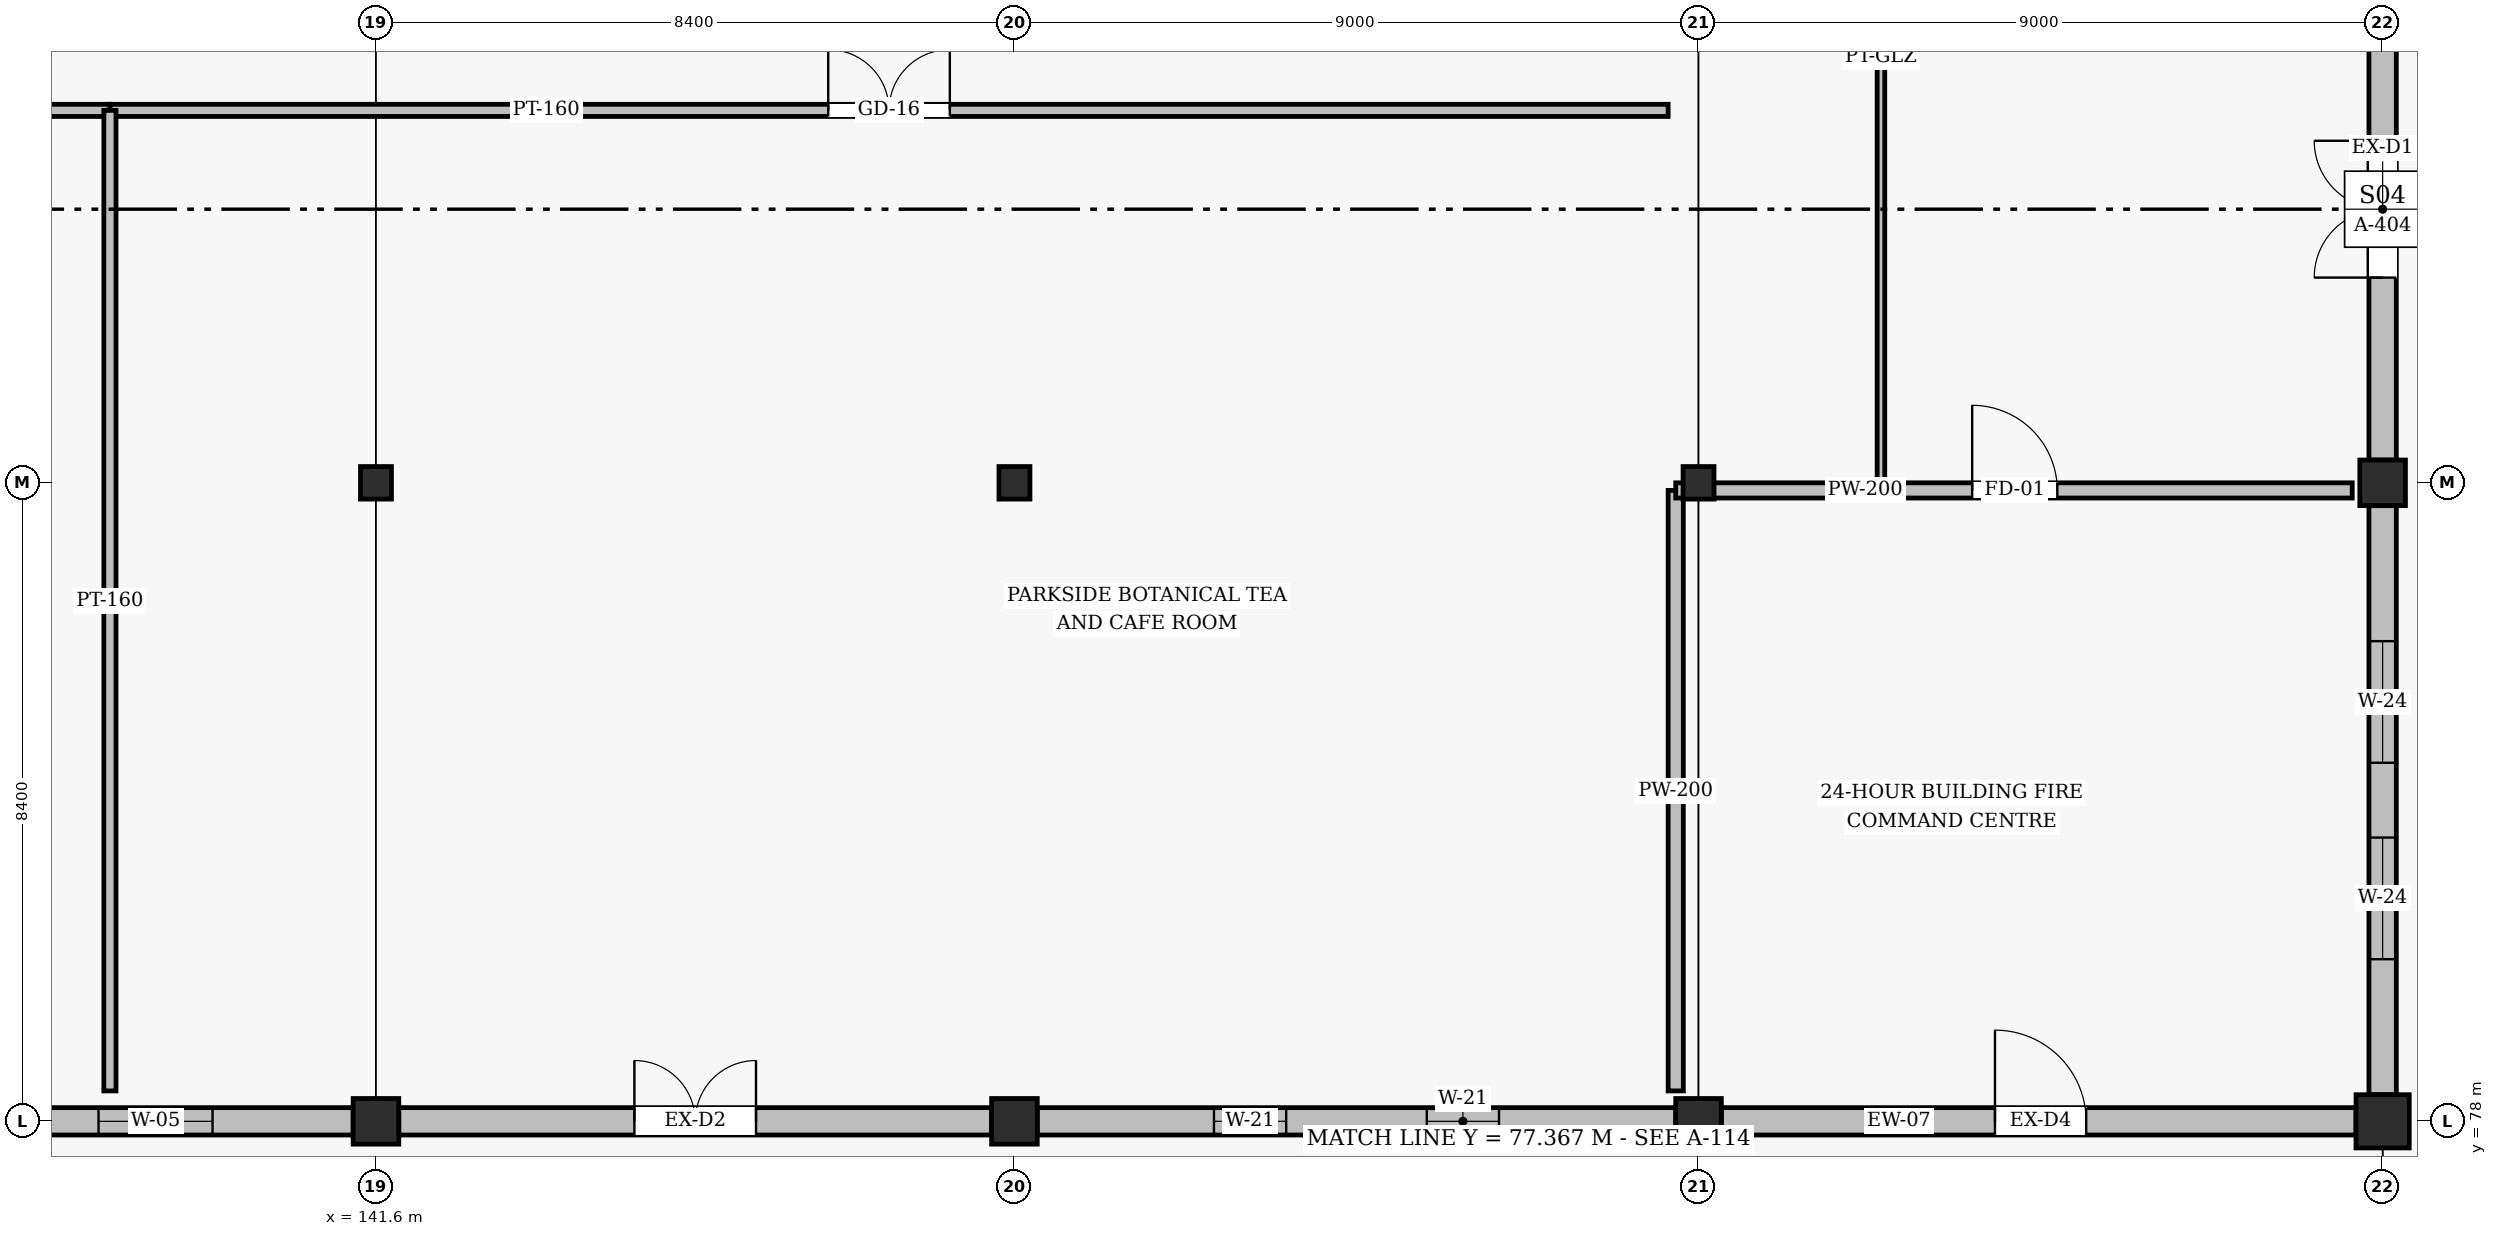
"""IFC4 building model, lengths in metres.
Left out: names, types, materials, properties, quantities, classifications, styles, units other than length and angle.
Written with IfcOpenShell. Run it as: python <this file> out.ifc"""

import sys

from ifc_helpers import new_model, si_unit, direction, frame, frame_2d, origin, origin_2d, place, context, subcontext, project, spatial, rectangle, hollow_rectangle, i_section, extrude, element, fill, save


model = new_model("IFC4")
c1 = context("Model", 3, precision=1e-05, world=origin(), true_north=direction((0.0, 1.0)))
c2 = subcontext(c1, "Body", "Model", "MODEL_VIEW")
j1 = project(units=[si_unit("LENGTHUNIT", "METRE"), si_unit("PLANEANGLEUNIT", "RADIAN")], contexts=[c1])
p1 = place(None, origin())
s1 = spatial("IfcSite", under=j1, at=p1, CompositionType="ELEMENT")
p2 = place(p1, origin())
s2 = spatial("IfcBuilding", under=s1, at=p2, CompositionType="ELEMENT")
p3 = place(p2, origin())
s3 = spatial("IfcBuildingStorey", under=s2, at=p3, CompositionType="ELEMENT", Elevation=0.0)
p4 = place(p3, frame((141.6, 78.0, 0.0), z_axis=(0.0, 0.0, 1.0), x_axis=(1.0, 0.0, 0.0)))
e1 = element("IfcColumn", 1, at=p4, inside=s3, PredefinedType="COLUMN", context=c2, shape_type="SweptSolid", body=[
    extrude(hollow_rectangle(XDim=0.6, YDim=0.6, WallThickness=0.025, InnerFilletRadius=0.025, OuterFilletRadius=0.05, at=origin_2d()), origin(), (0.0, 0.0, 1.0), 4.8),
])
p5 = place(p3, frame((141.6, 86.4, 0.0), z_axis=(0.0, 0.0, 1.0), x_axis=(1.0, 0.0, 0.0)))
e2 = element("IfcColumn", 2, at=p5, inside=s3, PredefinedType="COLUMN", context=c2, shape_type="SweptSolid", body=[
    extrude(i_section(OverallWidth=0.407, OverallDepth=0.428, WebThickness=0.02, FlangeThickness=0.035, FilletRadius=0.022, at=origin_2d()), origin(), (0.0, 0.0, 1.0), 4.8),
])
p6 = place(p3, frame((150.0, 78.0, 0.0), z_axis=(0.0, 0.0, 1.0), x_axis=(1.0, 0.0, 0.0)))
e3 = element("IfcColumn", 3, at=p6, inside=s3, PredefinedType="COLUMN", context=c2, shape_type="SweptSolid", body=[
    extrude(hollow_rectangle(XDim=0.6, YDim=0.6, WallThickness=0.025, InnerFilletRadius=0.025, OuterFilletRadius=0.05, at=origin_2d()), origin(), (0.0, 0.0, 1.0), 4.8),
])
p7 = place(p3, frame((150.0, 86.4, 0.0), z_axis=(0.0, 0.0, 1.0), x_axis=(1.0, 0.0, 0.0)))
e4 = element("IfcColumn", 4, at=p7, inside=s3, PredefinedType="COLUMN", context=c2, shape_type="SweptSolid", body=[
    extrude(i_section(OverallWidth=0.407, OverallDepth=0.428, WebThickness=0.02, FlangeThickness=0.035, FilletRadius=0.022, at=origin_2d()), origin(), (0.0, 0.0, 1.0), 4.8),
])
p8 = place(p3, frame((159.0, 78.0, 0.0), z_axis=(0.0, 0.0, 1.0), x_axis=(1.0, 0.0, 0.0)))
e5 = element("IfcColumn", 5, at=p8, inside=s3, PredefinedType="COLUMN", context=c2, shape_type="SweptSolid", body=[
    extrude(hollow_rectangle(XDim=0.6, YDim=0.6, WallThickness=0.025, InnerFilletRadius=0.025, OuterFilletRadius=0.05, at=origin_2d()), origin(), (0.0, 0.0, 1.0), 4.8),
])
p9 = place(p3, frame((159.0, 86.4, 0.0), z_axis=(0.0, 0.0, 1.0), x_axis=(1.0, 0.0, 0.0)))
e6 = element("IfcColumn", 6, at=p9, inside=s3, PredefinedType="COLUMN", context=c2, shape_type="SweptSolid", body=[
    extrude(i_section(OverallWidth=0.407, OverallDepth=0.428, WebThickness=0.02, FlangeThickness=0.035, FilletRadius=0.022, at=origin_2d()), origin(), (0.0, 0.0, 1.0), 4.8),
])
p10 = place(p3, frame((168.0, 78.0, 0.0), z_axis=(0.0, 0.0, 1.0), x_axis=(1.0, 0.0, 0.0)))
e7 = element("IfcColumn", 7, at=p10, inside=s3, PredefinedType="COLUMN", context=c2, shape_type="SweptSolid", body=[
    extrude(hollow_rectangle(XDim=0.7, YDim=0.7, WallThickness=0.032, InnerFilletRadius=0.032, OuterFilletRadius=0.064, at=origin_2d()), origin(), (0.0, 0.0, 1.0), 4.8),
])
p11 = place(p3, frame((168.0, 86.4, 0.0), z_axis=(0.0, 0.0, 1.0), x_axis=(1.0, 0.0, 0.0)))
e8 = element("IfcColumn", 8, at=p11, inside=s3, PredefinedType="COLUMN", context=c2, shape_type="SweptSolid", body=[
    extrude(hollow_rectangle(XDim=0.6, YDim=0.6, WallThickness=0.025, InnerFilletRadius=0.025, OuterFilletRadius=0.05, at=origin_2d()), origin(), (0.0, 0.0, 1.0), 4.8),
])
p12 = place(p3, frame((133.5, 78.0, 0.0), z_axis=(0.0, 0.0, 1.0), x_axis=(1.0, 0.0, 0.0)))
e9 = element("IfcWall", 9, at=p12, inside=s3, PredefinedType="SOLIDWALL", context=c2, shape_type="SweptSolid", body=[
    extrude(rectangle(XDim=7.8, YDim=0.36, at=frame_2d((3.9, 0.0))), origin(), (0.0, 0.0, 1.0), 3.868),
])
p13 = place(p12, frame((1.85, 0.0, 0.85)))
e10 = element("IfcOpeningElement", 10, at=p13, cuts=e9, PredefinedType="OPENING", context=c2, shape_type="SweptSolid", body=[
    extrude(rectangle(XDim=1.5, YDim=2.1, at=frame_2d((0.75, 1.05))), frame((0.0, 0.19, 0.0), z_axis=(0.0, -1.0, 0.0), x_axis=(1.0, 0.0, 0.0)), (0.0, 0.0, 1.0), 0.38),
])
p14 = place(p12, frame((4.45, 0.0, 0.85)))
e11 = element("IfcOpeningElement", 11, at=p14, cuts=e9, PredefinedType="OPENING", context=c2, shape_type="SweptSolid", body=[
    extrude(rectangle(XDim=1.5, YDim=2.1, at=frame_2d((0.75, 1.05))), frame((0.0, 0.19, 0.0), z_axis=(0.0, -1.0, 0.0), x_axis=(1.0, 0.0, 0.0)), (0.0, 0.0, 1.0), 0.38),
])
p15 = place(p3, frame((141.9, 78.0, 0.0), z_axis=(0.0, 0.0, 1.0), x_axis=(1.0, 0.0, 0.0)))
e12 = element("IfcWall", 12, at=p15, inside=s3, PredefinedType="SOLIDWALL", context=c2, shape_type="SweptSolid", body=[
    extrude(rectangle(XDim=7.8, YDim=0.36, at=frame_2d((3.9, 0.0))), origin(), (0.0, 0.0, 1.0), 3.868),
])
p16 = place(p15, frame((3.1, 0.0, 0.0)))
e13 = element("IfcOpeningElement", 13, at=p16, cuts=e12, PredefinedType="OPENING", context=c2, shape_type="SweptSolid", body=[
    extrude(rectangle(XDim=1.6, YDim=2.3, at=frame_2d((0.8, 1.15))), frame((0.0, 0.19, 0.0), z_axis=(0.0, -1.0, 0.0), x_axis=(1.0, 0.0, 0.0)), (0.0, 0.0, 1.0), 0.38),
])
p17 = place(p3, frame((150.3, 78.0, 0.0), z_axis=(0.0, 0.0, 1.0), x_axis=(1.0, 0.0, 0.0)))
e14 = element("IfcWall", 14, at=p17, inside=s3, PredefinedType="SOLIDWALL", context=c2, shape_type="SweptSolid", body=[
    extrude(rectangle(XDim=8.4, YDim=0.36, at=frame_2d((4.2, 0.0))), origin(), (0.0, 0.0, 1.0), 3.768),
])
p18 = place(p17, frame((2.325, 0.0, 0.95)))
e15 = element("IfcOpeningElement", 15, at=p18, cuts=e14, PredefinedType="OPENING", context=c2, shape_type="SweptSolid", body=[
    extrude(rectangle(XDim=0.95, YDim=1.75, at=frame_2d((0.475, 0.875))), frame((0.0, 0.19, 0.0), z_axis=(0.0, -1.0, 0.0), x_axis=(1.0, 0.0, 0.0)), (0.0, 0.0, 1.0), 0.38),
])
p19 = place(p17, frame((5.125, 0.0, 0.95)))
e16 = element("IfcOpeningElement", 16, at=p19, cuts=e14, PredefinedType="OPENING", context=c2, shape_type="SweptSolid", body=[
    extrude(rectangle(XDim=0.95, YDim=1.75, at=frame_2d((0.475, 0.875))), frame((0.0, 0.19, 0.0), z_axis=(0.0, -1.0, 0.0), x_axis=(1.0, 0.0, 0.0)), (0.0, 0.0, 1.0), 0.38),
])
p20 = place(p3, frame((159.3, 78.0, 0.0), z_axis=(0.0, 0.0, 1.0), x_axis=(1.0, 0.0, 0.0)))
e17 = element("IfcWall", 17, at=p20, inside=s3, PredefinedType="SOLIDWALL", context=c2, shape_type="SweptSolid", body=[
    extrude(rectangle(XDim=8.35, YDim=0.36, at=frame_2d((4.175, 0.0))), origin(), (0.0, 0.0, 1.0), 3.768),
])
p21 = place(p20, frame((3.6, 0.0, 0.0)))
e18 = element("IfcOpeningElement", 18, at=p21, cuts=e17, PredefinedType="OPENING", context=c2, shape_type="SweptSolid", body=[
    extrude(rectangle(XDim=1.2, YDim=2.2, at=frame_2d((0.6, 1.1))), frame((0.0, 0.19, 0.0), z_axis=(0.0, -1.0, 0.0), x_axis=(1.0, 0.0, 0.0)), (0.0, 0.0, 1.0), 0.38),
])
p22 = place(p3, frame((168.0, 78.35, 0.0), z_axis=(0.0, 0.0, 1.0), x_axis=(0.0, 1.0, 0.0)))
e19 = element("IfcWall", 19, at=p22, inside=s3, PredefinedType="SOLIDWALL", context=c2, shape_type="SweptSolid", body=[
    extrude(rectangle(XDim=7.75, YDim=0.36, at=frame_2d((3.875, 0.0))), origin(), (0.0, 0.0, 1.0), 4.06),
])
p23 = place(p22, frame((1.783, 0.0, 0.85)))
e20 = element("IfcOpeningElement", 20, at=p23, cuts=e19, PredefinedType="OPENING", context=c2, shape_type="SweptSolid", body=[
    extrude(rectangle(XDim=1.6, YDim=2.05, at=frame_2d((0.8, 1.025))), frame((0.0, 0.19, 0.0), z_axis=(0.0, -1.0, 0.0), x_axis=(1.0, 0.0, 0.0)), (0.0, 0.0, 1.0), 0.38),
])
p24 = place(p22, frame((4.367, 0.0, 0.85)))
e21 = element("IfcOpeningElement", 21, at=p24, cuts=e19, PredefinedType="OPENING", context=c2, shape_type="SweptSolid", body=[
    extrude(rectangle(XDim=1.6, YDim=2.05, at=frame_2d((0.8, 1.025))), frame((0.0, 0.19, 0.0), z_axis=(0.0, -1.0, 0.0), x_axis=(1.0, 0.0, 0.0)), (0.0, 0.0, 1.0), 0.38),
])
p25 = place(p3, frame((168.0, 86.7, 0.0), z_axis=(0.0, 0.0, 1.0), x_axis=(0.0, 1.0, 0.0)))
e22 = element("IfcWall", 22, at=p25, inside=s3, PredefinedType="SOLIDWALL", context=c2, shape_type="SweptSolid", body=[
    extrude(rectangle(XDim=7.8, YDim=0.36, at=frame_2d((3.9, 0.0))), origin(), (0.0, 0.0, 1.0), 4.06),
])
p26 = place(p25, frame((2.4, 0.0, 0.0)))
e23 = element("IfcOpeningElement", 23, at=p26, cuts=e22, PredefinedType="OPENING", context=c2, shape_type="SweptSolid", body=[
    extrude(rectangle(XDim=1.8, YDim=2.4, at=frame_2d((0.9, 1.2))), frame((0.0, 0.19, 0.0), z_axis=(0.0, -1.0, 0.0), x_axis=(1.0, 0.0, 0.0)), (0.0, 0.0, 1.0), 0.38),
])
p27 = place(p3, frame((116.8, 91.3, 0.0), z_axis=(0.0, 0.0, 1.0), x_axis=(1.0, 0.0, 0.0)))
e24 = element("IfcWall", 24, at=p27, inside=s3, PredefinedType="PARTITIONING", context=c2, shape_type="SweptSolid", body=[
    extrude(rectangle(XDim=21.3, YDim=0.16, at=frame_2d((10.65, 0.0))), origin(), (0.0, 0.0, 1.0), 4.06),
])
p28 = place(p27, frame((9.95, 0.0, 0.0)))
e25 = element("IfcOpeningElement", 25, at=p28, cuts=e24, PredefinedType="OPENING", context=c2, shape_type="SweptSolid", body=[
    extrude(rectangle(XDim=1.38, YDim=2.15, at=frame_2d((0.69, 1.075))), frame((0.0, 0.09, 0.0), z_axis=(0.0, -1.0, 0.0), x_axis=(1.0, 0.0, 0.0)), (0.0, 0.0, 1.0), 0.18),
])
p29 = place(p3, frame((138.1, 91.3, 0.0), z_axis=(0.0, 0.0, 1.0), x_axis=(1.0, 0.0, 0.0)))
e26 = element("IfcWall", 26, at=p29, inside=s3, PredefinedType="PARTITIONING", context=c2, shape_type="SweptSolid", body=[
    extrude(rectangle(XDim=20.5, YDim=0.16, at=frame_2d((10.25, 0.0))), origin(), (0.0, 0.0, 1.0), 4.06),
])
p30 = place(p29, frame((9.45, 0.0, 0.0)))
e27 = element("IfcOpeningElement", 27, at=p30, cuts=e26, PredefinedType="OPENING", context=c2, shape_type="SweptSolid", body=[
    extrude(rectangle(XDim=1.6, YDim=2.1, at=frame_2d((0.8, 1.05))), frame((0.0, 0.09, 0.0), z_axis=(0.0, -1.0, 0.0), x_axis=(1.0, 0.0, 0.0)), (0.0, 0.0, 1.0), 0.18),
])
p31 = place(p3, frame((138.1, 78.4, 0.0), z_axis=(0.0, 0.0, 1.0), x_axis=(0.0, 1.0, 0.0)))
e28 = element("IfcWall", 28, at=p31, inside=s3, PredefinedType="PARTITIONING", context=c2, shape_type="SweptSolid", body=[
    extrude(rectangle(XDim=12.9, YDim=0.16, at=frame_2d((6.45, 0.0))), origin(), (0.0, 0.0, 1.0), 4.06),
])
p32 = place(p3, frame((158.7, 78.4, 0.0), z_axis=(0.0, 0.0, 1.0), x_axis=(0.0, 1.0, 0.0)))
e29 = element("IfcWall", 29, at=p32, inside=s3, PredefinedType="SOLIDWALL", context=c2, shape_type="SweptSolid", body=[
    extrude(rectangle(XDim=7.9, YDim=0.2, at=frame_2d((3.95, 0.0))), origin(), (0.0, 0.0, 1.0), 4.16),
])
p33 = place(p3, frame((158.7, 86.3, 0.0), z_axis=(0.0, 0.0, 1.0), x_axis=(1.0, 0.0, 0.0)))
e30 = element("IfcWall", 30, at=p33, inside=s3, PredefinedType="SOLIDWALL", context=c2, shape_type="SweptSolid", body=[
    extrude(rectangle(XDim=8.9, YDim=0.2, at=frame_2d((4.45, 0.0))), origin(), (0.0, 0.0, 1.0), 3.91),
])
p34 = place(p33, frame((3.9, 0.0, 0.0)))
e31 = element("IfcOpeningElement", 31, at=p34, cuts=e30, PredefinedType="OPENING", context=c2, shape_type="SweptSolid", body=[
    extrude(rectangle(XDim=1.12, YDim=2.18, at=frame_2d((0.56, 1.09))), frame((0.0, 0.11, 0.0), z_axis=(0.0, -1.0, 0.0), x_axis=(1.0, 0.0, 0.0)), (0.0, 0.0, 1.0), 0.22),
])
p35 = place(p3, frame((161.4, 86.4, 0.0), z_axis=(0.0, 0.0, 1.0), x_axis=(0.0, 1.0, 0.0)))
e32 = element("IfcWall", 32, at=p35, inside=s3, PredefinedType="PARTITIONING", context=c2, shape_type="SweptSolid", body=[
    extrude(rectangle(XDim=20.0, YDim=0.1, at=frame_2d((10.0, 0.0))), origin(), (0.0, 0.0, 1.0), 3.91),
])
p36 = place(p35, frame((9.2, 0.0, 0.0)))
e33 = element("IfcOpeningElement", 33, at=p36, cuts=e32, PredefinedType="OPENING", context=c2, shape_type="SweptSolid", body=[
    extrude(rectangle(XDim=1.6, YDim=2.1, at=frame_2d((0.8, 1.05))), frame((0.0, 0.06, 0.0), z_axis=(0.0, -1.0, 0.0), x_axis=(1.0, 0.0, 0.0)), (0.0, 0.0, 1.0), 0.12),
])
p37 = place(p14, origin())
e34 = element("IfcWindow", 34, at=p37, inside=s3, PartitioningType="SINGLE_PANEL", PredefinedType="WINDOW", context=c2, shape_type="SweptSolid", body=[
    extrude(rectangle(XDim=1.5, YDim=2.1, at=frame_2d((0.75, 1.05))), frame((0.0, 0.03, 0.0), z_axis=(0.0, -1.0, 0.0), x_axis=(1.0, 0.0, 0.0)), (0.0, 0.0, 1.0), 0.06),
])
fill(e11, e34)
p38 = place(p16, frame((1.6, 0.0, 0.0), z_axis=(0.0, 0.0, 1.0), x_axis=(-1.0, 0.0, 0.0)))
e35 = element("IfcDoor", 35, at=p38, inside=s3, OperationType="DOUBLE_DOOR_SINGLE_SWING", PredefinedType="DOOR", context=c2, shape_type="SweptSolid", body=[
    extrude(rectangle(XDim=1.6, YDim=2.3, at=frame_2d((0.8, 1.15))), frame((0.0, 0.025, 0.0), z_axis=(0.0, -1.0, 0.0), x_axis=(1.0, 0.0, 0.0)), (0.0, 0.0, 1.0), 0.05),
])
fill(e13, e35)
p39 = place(p18, origin())
e36 = element("IfcWindow", 36, at=p39, inside=s3, PartitioningType="SINGLE_PANEL", PredefinedType="WINDOW", context=c2, shape_type="SweptSolid", body=[
    extrude(rectangle(XDim=0.95, YDim=1.75, at=frame_2d((0.475, 0.875))), frame((0.0, 0.03, 0.0), z_axis=(0.0, -1.0, 0.0), x_axis=(1.0, 0.0, 0.0)), (0.0, 0.0, 1.0), 0.06),
])
fill(e15, e36)
p40 = place(p19, origin())
e37 = element("IfcWindow", 37, at=p40, inside=s3, PartitioningType="SINGLE_PANEL", PredefinedType="WINDOW", context=c2, shape_type="SweptSolid", body=[
    extrude(rectangle(XDim=0.95, YDim=1.75, at=frame_2d((0.475, 0.875))), frame((0.0, 0.03, 0.0), z_axis=(0.0, -1.0, 0.0), x_axis=(1.0, 0.0, 0.0)), (0.0, 0.0, 1.0), 0.06),
])
fill(e16, e37)
p41 = place(p21, frame((1.2, 0.0, 0.0), z_axis=(0.0, 0.0, 1.0), x_axis=(-1.0, 0.0, 0.0)))
e38 = element("IfcDoor", 38, at=p41, inside=s3, OperationType="SINGLE_SWING_LEFT", PredefinedType="DOOR", context=c2, shape_type="SweptSolid", body=[
    extrude(rectangle(XDim=1.2, YDim=2.2, at=frame_2d((0.6, 1.1))), frame((0.0, 0.025, 0.0), z_axis=(0.0, -1.0, 0.0), x_axis=(1.0, 0.0, 0.0)), (0.0, 0.0, 1.0), 0.05),
])
fill(e18, e38)
p42 = place(p23, origin())
e39 = element("IfcWindow", 39, at=p42, inside=s3, PartitioningType="SINGLE_PANEL", PredefinedType="WINDOW", context=c2, shape_type="SweptSolid", body=[
    extrude(rectangle(XDim=1.6, YDim=2.05, at=frame_2d((0.8, 1.025))), frame((0.0, 0.03, 0.0), z_axis=(0.0, -1.0, 0.0), x_axis=(1.0, 0.0, 0.0)), (0.0, 0.0, 1.0), 0.06),
])
fill(e20, e39)
p43 = place(p24, origin())
e40 = element("IfcWindow", 40, at=p43, inside=s3, PartitioningType="SINGLE_PANEL", PredefinedType="WINDOW", context=c2, shape_type="SweptSolid", body=[
    extrude(rectangle(XDim=1.6, YDim=2.05, at=frame_2d((0.8, 1.025))), frame((0.0, 0.03, 0.0), z_axis=(0.0, -1.0, 0.0), x_axis=(1.0, 0.0, 0.0)), (0.0, 0.0, 1.0), 0.06),
])
fill(e21, e40)
p44 = place(p26, frame((1.8, 0.0, 0.0), z_axis=(0.0, 0.0, 1.0), x_axis=(-1.0, 0.0, 0.0)))
e41 = element("IfcDoor", 41, at=p44, inside=s3, OperationType="DOUBLE_DOOR_SINGLE_SWING", PredefinedType="DOOR", context=c2, shape_type="SweptSolid", body=[
    extrude(rectangle(XDim=1.8, YDim=2.4, at=frame_2d((0.9, 1.2))), frame((0.0, 0.025, 0.0), z_axis=(0.0, -1.0, 0.0), x_axis=(1.0, 0.0, 0.0)), (0.0, 0.0, 1.0), 0.05),
])
fill(e23, e41)
p45 = place(p30, origin())
e42 = element("IfcDoor", 42, at=p45, inside=s3, OperationType="DOUBLE_DOOR_SINGLE_SWING", PredefinedType="DOOR", context=c2, shape_type="SweptSolid", body=[
    extrude(rectangle(XDim=1.6, YDim=2.1, at=frame_2d((0.8, 1.05))), frame((0.0, 0.025, 0.0), z_axis=(0.0, -1.0, 0.0), x_axis=(1.0, 0.0, 0.0)), (0.0, 0.0, 1.0), 0.05),
])
fill(e27, e42)
p46 = place(p34, origin())
e43 = element("IfcDoor", 43, at=p46, inside=s3, OperationType="SINGLE_SWING_LEFT", PredefinedType="DOOR", context=c2, shape_type="SweptSolid", body=[
    extrude(rectangle(XDim=1.12, YDim=2.18, at=frame_2d((0.56, 1.09))), frame((0.0, 0.025, 0.0), z_axis=(0.0, -1.0, 0.0), x_axis=(1.0, 0.0, 0.0)), (0.0, 0.0, 1.0), 0.05),
])
fill(e31, e43)
save(model, sys.argv[1])
